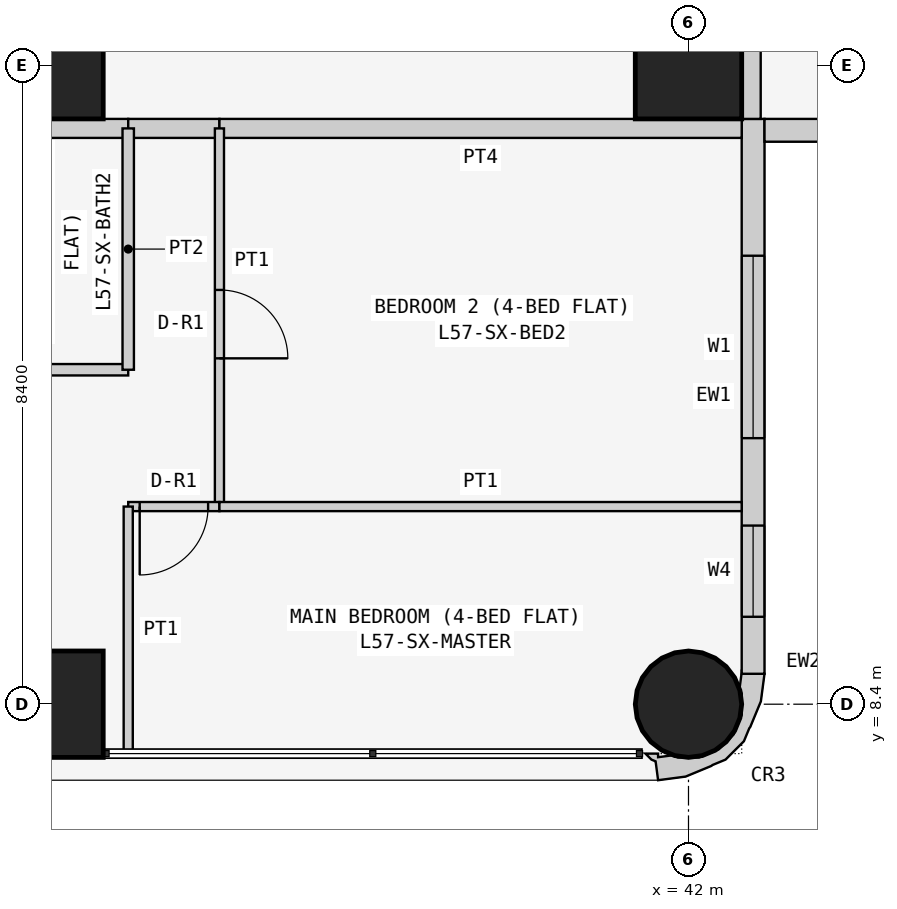
"""IFC4 building model, lengths in metres.
Left out: names, types, materials, properties, quantities, classifications, styles, units other than length and angle.
Written with IfcOpenShell. Run it as: python <this file> out.ifc"""

import sys

from ifc_helpers import new_model, si_unit, direction, frame, frame_2d, origin, origin_2d, place, context, subcontext, project, spatial, polyline, rectangle, circle, outline, extrude, element, fill, save


model = new_model("IFC4")
c1 = context("Model", 3, precision=1e-05, world=origin(), true_north=direction((0.0, 1.0)))
c2 = subcontext(c1, "Body", "Model", "MODEL_VIEW")
j1 = project(units=[si_unit("LENGTHUNIT", "METRE"), si_unit("PLANEANGLEUNIT", "RADIAN")], contexts=[c1])
p1 = place(None, origin())
s1 = spatial("IfcSite", under=j1, at=p1, CompositionType="ELEMENT")
p2 = place(p1, origin())
s2 = spatial("IfcBuilding", under=s1, at=p2, CompositionType="ELEMENT")
p3 = place(p2, frame((0.0, 0.0, 219.3)))
s3 = spatial("IfcBuildingStorey", under=s2, at=p3, CompositionType="ELEMENT", Elevation=219.3)
for number, where, z_axis, x_axis in (
    (1, (33.6, 8.4, 0.0), (0.0, 0.0, 1.0), (1.0, 0.0, 0.0)),
    (2, (33.6, 16.8, 0.0), (0.0, 0.0, 1.0), (1.0, 0.0, 0.0)),
):
    element("IfcColumn", number, at=place(p3, frame(where, z_axis=z_axis, x_axis=x_axis)), inside=s3, PredefinedType="COLUMN", context=c2, shape_type="SweptSolid", body=[
        extrude(rectangle(XDim=1.4, YDim=1.4, at=origin_2d()), origin(), (0.0, 0.0, 1.0), 3.6),
    ])
p4 = place(p3, frame((42.0, 8.4, 0.0), z_axis=(0.0, 0.0, 1.0), x_axis=(1.0, 0.0, 0.0)))
e3 = element("IfcColumn", 3, at=p4, inside=s3, PredefinedType="COLUMN", context=c2, shape_type="SweptSolid", body=[
    extrude(circle(Radius=0.7, at=origin_2d()), origin(), (0.0, 0.0, 1.0), 3.6),
])
p5 = place(p3, frame((42.0, 16.8, 0.0), z_axis=(0.0, 0.0, 1.0), x_axis=(1.0, 0.0, 0.0)))
e4 = element("IfcColumn", 4, at=p5, inside=s3, PredefinedType="COLUMN", context=c2, shape_type="SweptSolid", body=[
    extrude(rectangle(XDim=1.4, YDim=1.4, at=origin_2d()), origin(), (0.0, 0.0, 1.0), 3.6),
])
p6 = place(p3, frame((42.85, 8.8, 0.0), z_axis=(0.0, 0.0, 1.0), x_axis=(0.0, 1.0, 0.0)))
e5 = element("IfcWall", 5, at=p6, inside=s3, PredefinedType="SOLIDWALL", context=c2, shape_type="SweptSolid", body=[
    extrude(rectangle(XDim=7.3, YDim=0.3, at=frame_2d((3.65, 0.0))), origin(), (0.0, 0.0, 1.0), 3.45),
])
p7 = place(p6, frame((3.1, 0.0, 0.9)))
e6 = element("IfcOpeningElement", 6, at=p7, cuts=e5, PredefinedType="OPENING", context=c2, shape_type="SweptSolid", body=[
    extrude(rectangle(XDim=2.4, YDim=1.5, at=frame_2d((1.2, 0.75))), frame((0.0, 0.16, 0.0), z_axis=(0.0, -1.0, 0.0), x_axis=(1.0, 0.0, 0.0)), (0.0, 0.0, 1.0), 0.32),
])
p8 = place(p6, frame((0.75, 0.0, 0.9)))
e7 = element("IfcOpeningElement", 7, at=p8, cuts=e5, PredefinedType="OPENING", context=c2, shape_type="SweptSolid", body=[
    extrude(rectangle(XDim=1.2, YDim=1.5, at=frame_2d((0.6, 0.75))), frame((0.0, 0.16, 0.0), z_axis=(0.0, -1.0, 0.0), x_axis=(1.0, 0.0, 0.0)), (0.0, 0.0, 1.0), 0.32),
])
p9 = place(p3, frame((43.0, 15.95, 0.0), z_axis=(0.0, 0.0, 1.0), x_axis=(1.0, 0.0, 0.0)))
e8 = element("IfcWall", 8, at=p9, inside=s3, PredefinedType="SOLIDWALL", context=c2, shape_type="SweptSolid", body=[
    extrude(rectangle(XDim=7.0, YDim=0.3, at=frame_2d((3.5, 0.0))), origin(), (0.0, 0.0, 1.0), 3.45),
])
p10 = place(p9, frame((1.5, 0.0, 0.9)))
e9 = element("IfcOpeningElement", 9, at=p10, cuts=e8, PredefinedType="OPENING", context=c2, shape_type="SweptSolid", body=[
    extrude(rectangle(XDim=2.4, YDim=1.5, at=frame_2d((1.2, 0.75))), frame((0.0, 0.16, 0.0), z_axis=(0.0, -1.0, 0.0), x_axis=(1.0, 0.0, 0.0)), (0.0, 0.0, 1.0), 0.32),
])
p11 = place(p9, frame((5.05, 0.0, 0.9)))
e10 = element("IfcOpeningElement", 10, at=p11, cuts=e8, PredefinedType="OPENING", context=c2, shape_type="SweptSolid", body=[
    extrude(rectangle(XDim=1.2, YDim=1.5, at=frame_2d((0.6, 0.75))), frame((0.0, 0.16, 0.0), z_axis=(0.0, -1.0, 0.0), x_axis=(1.0, 0.0, 0.0)), (0.0, 0.0, 1.0), 0.32),
])
p12 = place(p3, frame((41.488, 7.812, 0.0), z_axis=(0.0, 0.0, 1.0), x_axis=(0.439933741929, -0.898030234854, 0.0)))
e11 = element("IfcWall", 11, at=p12, inside=s3, PredefinedType="SOLIDWALL", context=c2, shape_type="SweptSolid", body=[
    extrude(outline(polyline([(-0.222, 1.793), (-0.39, 1.541), (-0.372, 1.532), (-0.195, 1.414), (-0.12, 1.41), (0.131, 1.287), (0.315, 1.078), (0.406, 0.814), (0.388, 0.536), (0.265, 0.285), (0.209, 0.235), (0.148, 0.053), (0.105, 0.074), (0.032, -0.076), (0.138, -0.04), (0.182, -0.0), (0.419, -0.08), (0.536, 0.266), (0.559, 0.631), (0.555, 0.651), (0.566, 0.836), (0.455, 1.159), (0.333, 1.298), (0.324, 1.317), (0.082, 1.591), (-0.222, 1.793)])), origin(), (0.0, 0.0, 1.0), 3.45),
])
p13 = place(p3, frame((42.825, 22.571, 0.0), z_axis=(0.0, 0.0, 1.0), x_axis=(0.0, -1.0, 0.0)))
e12 = element("IfcWall", 12, at=p13, inside=s3, PredefinedType="PARTITIONING", context=c2, shape_type="SweptSolid", body=[
    extrude(rectangle(XDim=6.471, YDim=0.25, at=frame_2d((3.235, 0.0))), origin(), (0.0, 0.0, 1.0), 3.45),
])
p14 = place(p3, frame((34.629, 15.975, 0.0), z_axis=(0.0, 0.0, 1.0), x_axis=(-1.0, 0.0, 0.0)))
e13 = element("IfcWall", 13, at=p14, inside=s3, PredefinedType="PARTITIONING", context=c2, shape_type="SweptSolid", body=[
    extrude(rectangle(XDim=2.629, YDim=0.25, at=frame_2d((1.314, 0.0))), origin(), (0.0, 0.0, 1.0), 3.45),
])
p15 = place(p3, frame((35.829, 15.975, 0.0), z_axis=(0.0, 0.0, 1.0), x_axis=(-1.0, 0.0, 0.0)))
e14 = element("IfcWall", 14, at=p15, inside=s3, PredefinedType="PARTITIONING", context=c2, shape_type="SweptSolid", body=[
    extrude(rectangle(XDim=1.2, YDim=0.25, at=frame_2d((0.6, 0.0))), origin(), (0.0, 0.0, 1.0), 3.45),
])
p16 = place(p3, frame((42.7, 15.975, 0.0), z_axis=(0.0, 0.0, 1.0), x_axis=(-1.0, 0.0, 0.0)))
e15 = element("IfcWall", 15, at=p16, inside=s3, PredefinedType="PARTITIONING", context=c2, shape_type="SweptSolid", body=[
    extrude(rectangle(XDim=6.871, YDim=0.25, at=frame_2d((3.436, 0.0))), origin(), (0.0, 0.0, 1.0), 3.45),
])
p17 = place(p3, frame((32.0, 12.8, 0.0), z_axis=(0.0, 0.0, 1.0), x_axis=(1.0, 0.0, 0.0)))
e16 = element("IfcWall", 16, at=p17, inside=s3, PredefinedType="PARTITIONING", context=c2, shape_type="SweptSolid", body=[
    extrude(rectangle(XDim=2.629, YDim=0.15, at=frame_2d((1.314, 0.0))), origin(), (0.0, 0.0, 1.0), 3.45),
])
p18 = place(p3, frame((34.629, 12.8, 0.0), z_axis=(0.0, 0.0, 1.0), x_axis=(0.0, 1.0, 0.0)))
e17 = element("IfcWall", 17, at=p18, inside=s3, PredefinedType="PARTITIONING", context=c2, shape_type="SweptSolid", body=[
    extrude(rectangle(XDim=3.175, YDim=0.15, at=frame_2d((1.587, 0.0))), origin(), (0.0, 0.0, 1.0), 3.45),
])
p19 = place(p3, frame((35.829, 15.975, 0.0), z_axis=(0.0, 0.0, 1.0), x_axis=(0.0, -1.0, 0.0)))
e18 = element("IfcWall", 18, at=p19, inside=s3, PredefinedType="PARTITIONING", context=c2, shape_type="SweptSolid", body=[
    extrude(rectangle(XDim=4.975, YDim=0.12, at=frame_2d((2.488, 0.0))), origin(), (0.0, 0.0, 1.0), 3.45),
])
p20 = place(p19, frame((2.125, 0.0, 0.0)))
e19 = element("IfcOpeningElement", 19, at=p20, cuts=e18, PredefinedType="OPENING", context=c2, shape_type="SweptSolid", body=[
    extrude(rectangle(XDim=0.9, YDim=2.1, at=frame_2d((0.45, 1.05))), frame((0.0, 0.07, 0.0), z_axis=(0.0, -1.0, 0.0), x_axis=(1.0, 0.0, 0.0)), (0.0, 0.0, 1.0), 0.14),
])
p21 = place(p3, frame((35.829, 11.0, 0.0), z_axis=(0.0, 0.0, 1.0), x_axis=(-1.0, 0.0, 0.0)))
e20 = element("IfcWall", 20, at=p21, inside=s3, PredefinedType="PARTITIONING", context=c2, shape_type="SweptSolid", body=[
    extrude(rectangle(XDim=1.2, YDim=0.12, at=frame_2d((0.6, 0.0))), origin(), (0.0, 0.0, 1.0), 3.45),
])
p22 = place(p21, frame((0.149, 0.0, 0.0)))
e21 = element("IfcOpeningElement", 21, at=p22, cuts=e20, PredefinedType="OPENING", context=c2, shape_type="SweptSolid", body=[
    extrude(rectangle(XDim=0.9, YDim=2.1, at=frame_2d((0.45, 1.05))), frame((0.0, 0.07, 0.0), z_axis=(0.0, -1.0, 0.0), x_axis=(1.0, 0.0, 0.0)), (0.0, 0.0, 1.0), 0.14),
])
p23 = place(p3, frame((34.629, 11.0, 0.0), z_axis=(0.0, 0.0, 1.0), x_axis=(0.0, -1.0, 0.0)))
e22 = element("IfcWall", 22, at=p23, inside=s3, PredefinedType="PARTITIONING", context=c2, shape_type="SweptSolid", body=[
    extrude(rectangle(XDim=3.25, YDim=0.12, at=frame_2d((1.625, 0.0))), origin(), (0.0, 0.0, 1.0), 3.45),
])
p24 = place(p3, frame((35.829, 11.0, 0.0), z_axis=(0.0, 0.0, 1.0), x_axis=(1.0, 0.0, 0.0)))
e23 = element("IfcWall", 23, at=p24, inside=s3, PredefinedType="PARTITIONING", context=c2, shape_type="SweptSolid", body=[
    extrude(rectangle(XDim=6.871, YDim=0.12, at=frame_2d((3.436, 0.0))), origin(), (0.0, 0.0, 1.0), 3.45),
])
p25 = place(p7, origin())
e24 = element("IfcWindow", 24, at=p25, inside=s3, PartitioningType="SINGLE_PANEL", PredefinedType="WINDOW", context=c2, shape_type="SweptSolid", body=[
    extrude(rectangle(XDim=2.4, YDim=1.5, at=frame_2d((1.2, 0.75))), frame((0.0, 0.03, 0.0), z_axis=(0.0, -1.0, 0.0), x_axis=(1.0, 0.0, 0.0)), (0.0, 0.0, 1.0), 0.06),
])
fill(e6, e24)
p26 = place(p8, origin())
e25 = element("IfcWindow", 25, at=p26, inside=s3, PartitioningType="SINGLE_PANEL", PredefinedType="WINDOW", context=c2, shape_type="SweptSolid", body=[
    extrude(rectangle(XDim=1.2, YDim=1.5, at=frame_2d((0.6, 0.75))), frame((0.0, 0.03, 0.0), z_axis=(0.0, -1.0, 0.0), x_axis=(1.0, 0.0, 0.0)), (0.0, 0.0, 1.0), 0.06),
])
fill(e7, e25)
p27 = place(p20, origin())
e26 = element("IfcDoor", 26, at=p27, inside=s3, OperationType="SINGLE_SWING_RIGHT", PredefinedType="DOOR", context=c2, shape_type="SweptSolid", body=[
    extrude(rectangle(XDim=0.9, YDim=2.1, at=frame_2d((0.45, 1.05))), frame((0.0, 0.025, 0.0), z_axis=(0.0, -1.0, 0.0), x_axis=(1.0, 0.0, 0.0)), (0.0, 0.0, 1.0), 0.05),
])
fill(e19, e26)
p28 = place(p22, origin())
e27 = element("IfcDoor", 27, at=p28, inside=s3, OperationType="SINGLE_SWING_RIGHT", PredefinedType="DOOR", context=c2, shape_type="SweptSolid", body=[
    extrude(rectangle(XDim=0.9, YDim=2.1, at=frame_2d((0.45, 1.05))), frame((0.0, 0.025, 0.0), z_axis=(0.0, -1.0, 0.0), x_axis=(1.0, 0.0, 0.0)), (0.0, 0.0, 1.0), 0.05),
])
fill(e21, e27)
save(model, sys.argv[1])
